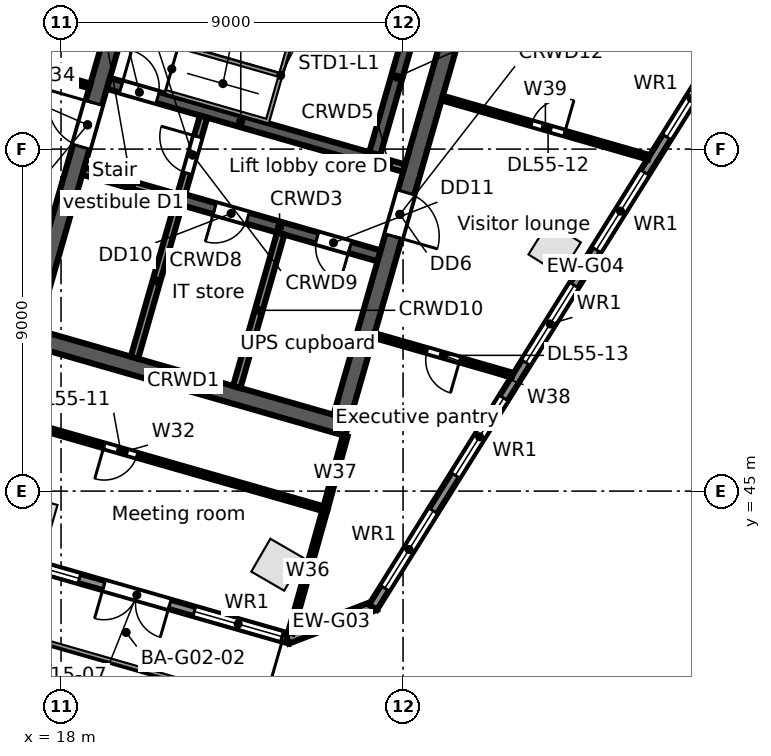
"""IFC4 building model, lengths in metres.
Left out: names, types, materials, properties, quantities, classifications, styles, units other than length and angle.
Written with IfcOpenShell. Run it as: python <this file> out.ifc"""

import sys

from ifc_helpers import new_model, si_unit, direction, frame, frame_2d, origin, origin_2d, place, context, subcontext, project, spatial, rectangle, extrude, element, fill, save


model = new_model("IFC4")
c1 = context("Model", 3, precision=1e-05, world=origin(), true_north=direction((0.0, 1.0)))
c2 = subcontext(c1, "Body", "Model", "MODEL_VIEW")
j1 = project(units=[si_unit("LENGTHUNIT", "METRE"), si_unit("PLANEANGLEUNIT", "RADIAN")], contexts=[c1])
p1 = place(None, origin())
s1 = spatial("IfcSite", under=j1, at=p1, CompositionType="ELEMENT")
p2 = place(p1, origin())
s2 = spatial("IfcBuilding", under=s1, at=p2, CompositionType="ELEMENT")
p3 = place(p2, frame((0.0, 0.0, 254.3)))
s3 = spatial("IfcBuildingStorey", under=s2, at=p3, CompositionType="ELEMENT", Elevation=254.3)
for number, where, z_axis, x_axis in (
    (1, (17.288, 44.291, 0.0), (0.0, 0.0, 1.0), (0.961, -0.276, 0.0)),
    (2, (23.69, 43.063, 0.0), (0.0, 0.0, 1.0), (-0.865, 0.501, 0.0)),
    (3, (30.99, 51.386, 0.0), (0.0, 0.0, 1.0), (0.53, 0.848, 0.0)),
):
    element("IfcColumn", number, at=place(p3, frame(where, z_axis=z_axis, x_axis=x_axis)), inside=s3, PredefinedType="COLUMN", context=c2, shape_type="SweptSolid", body=[
        extrude(rectangle(XDim=1.0, YDim=1.0, at=origin_2d()), origin(), (0.0, 0.0, 1.0), 3.9),
    ])
p4 = place(p3, frame((24.034, 41.108, 0.0), z_axis=(0.0, 0.0, 1.0), x_axis=(-0.96126060691, 0.275641153683, 0.0)))
e4 = element("IfcWall", 4, at=p4, inside=s3, PredefinedType="STANDARD", context=c2, shape_type="SweptSolid", body=[
    extrude(rectangle(XDim=24.951, YDim=0.25, at=frame_2d((12.475, 0.0))), origin(), (0.0, 0.0, 1.0), 3.55),
])
p5 = place(p4, frame((22.416, 0.0, 0.8)))
e5 = element("IfcOpeningElement", 5, at=p5, cuts=e4, PredefinedType="OPENING", context=c2, shape_type="SweptSolid", body=[
    extrude(rectangle(XDim=2.4, YDim=2.2, at=frame_2d((1.2, 1.1))), frame((0.0, 0.135, 0.0), z_axis=(0.0, -1.0, 0.0), x_axis=(1.0, 0.0, 0.0)), (0.0, 0.0, 1.0), 0.27),
])
p6 = place(p4, frame((19.643, 0.0, 0.8)))
e6 = element("IfcOpeningElement", 6, at=p6, cuts=e4, PredefinedType="OPENING", context=c2, shape_type="SweptSolid", body=[
    extrude(rectangle(XDim=2.4, YDim=2.2, at=frame_2d((1.2, 1.1))), frame((0.0, 0.135, 0.0), z_axis=(0.0, -1.0, 0.0), x_axis=(1.0, 0.0, 0.0)), (0.0, 0.0, 1.0), 0.27),
])
p7 = place(p4, frame((16.869, 0.0, 0.8)))
e7 = element("IfcOpeningElement", 7, at=p7, cuts=e4, PredefinedType="OPENING", context=c2, shape_type="SweptSolid", body=[
    extrude(rectangle(XDim=2.4, YDim=2.2, at=frame_2d((1.2, 1.1))), frame((0.0, 0.135, 0.0), z_axis=(0.0, -1.0, 0.0), x_axis=(1.0, 0.0, 0.0)), (0.0, 0.0, 1.0), 0.27),
])
p8 = place(p4, frame((14.096, 0.0, 0.8)))
e8 = element("IfcOpeningElement", 8, at=p8, cuts=e4, PredefinedType="OPENING", context=c2, shape_type="SweptSolid", body=[
    extrude(rectangle(XDim=2.4, YDim=2.2, at=frame_2d((1.2, 1.1))), frame((0.0, 0.135, 0.0), z_axis=(0.0, -1.0, 0.0), x_axis=(1.0, 0.0, 0.0)), (0.0, 0.0, 1.0), 0.27),
])
p9 = place(p4, frame((11.622, 0.0, 0.0)))
e9 = element("IfcOpeningElement", 9, at=p9, cuts=e4, PredefinedType="OPENING", context=c2, shape_type="SweptSolid", body=[
    extrude(rectangle(XDim=1.8, YDim=2.4, at=frame_2d((0.9, 1.2))), frame((0.0, 0.135, 0.0), z_axis=(0.0, -1.0, 0.0), x_axis=(1.0, 0.0, 0.0)), (0.0, 0.0, 1.0), 0.27),
])
p10 = place(p4, frame((8.549, 0.0, 0.8)))
e10 = element("IfcOpeningElement", 10, at=p10, cuts=e4, PredefinedType="OPENING", context=c2, shape_type="SweptSolid", body=[
    extrude(rectangle(XDim=2.4, YDim=2.2, at=frame_2d((1.2, 1.1))), frame((0.0, 0.135, 0.0), z_axis=(0.0, -1.0, 0.0), x_axis=(1.0, 0.0, 0.0)), (0.0, 0.0, 1.0), 0.27),
])
p11 = place(p4, frame((5.775, 0.0, 0.8)))
e11 = element("IfcOpeningElement", 11, at=p11, cuts=e4, PredefinedType="OPENING", context=c2, shape_type="SweptSolid", body=[
    extrude(rectangle(XDim=2.4, YDim=2.2, at=frame_2d((1.2, 1.1))), frame((0.0, 0.135, 0.0), z_axis=(0.0, -1.0, 0.0), x_axis=(1.0, 0.0, 0.0)), (0.0, 0.0, 1.0), 0.27),
])
p12 = place(p4, frame((3.302, 0.0, 0.0)))
e12 = element("IfcOpeningElement", 12, at=p12, cuts=e4, PredefinedType="OPENING", context=c2, shape_type="SweptSolid", body=[
    extrude(rectangle(XDim=1.8, YDim=2.4, at=frame_2d((0.9, 1.2))), frame((0.0, 0.135, 0.0), z_axis=(0.0, -1.0, 0.0), x_axis=(1.0, 0.0, 0.0)), (0.0, 0.0, 1.0), 0.27),
])
p13 = place(p4, frame((0.229, 0.0, 0.8)))
e13 = element("IfcOpeningElement", 13, at=p13, cuts=e4, PredefinedType="OPENING", context=c2, shape_type="SweptSolid", body=[
    extrude(rectangle(XDim=2.4, YDim=2.2, at=frame_2d((1.2, 1.1))), frame((0.0, 0.135, 0.0), z_axis=(0.0, -1.0, 0.0), x_axis=(1.0, 0.0, 0.0)), (0.0, 0.0, 1.0), 0.27),
])
p14 = place(p3, frame((26.27, 41.993, 0.0), z_axis=(0.0, 0.0, 1.0), x_axis=(-0.933573798066, -0.358385216722, 0.0)))
e14 = element("IfcWall", 14, at=p14, inside=s3, PredefinedType="STANDARD", context=c2, shape_type="SweptSolid", body=[
    extrude(rectangle(XDim=2.48, YDim=0.25, at=frame_2d((1.24, 0.0))), origin(), (0.0, 0.0, 1.0), 3.55),
])
p15 = place(p3, frame((37.392, 59.84, 0.0), z_axis=(0.0, 0.0, 1.0), x_axis=(-0.529919909431, -0.848047692992, 0.0)))
e15 = element("IfcWall", 15, at=p15, inside=s3, PredefinedType="STANDARD", context=c2, shape_type="SweptSolid", body=[
    extrude(rectangle(XDim=21.104, YDim=0.25, at=frame_2d((10.552, 0.0))), origin(), (0.0, 0.0, 1.0), 3.55),
])
p16 = place(p15, frame((18.112, 0.0, 0.8)))
e16 = element("IfcOpeningElement", 16, at=p16, cuts=e15, PredefinedType="OPENING", context=c2, shape_type="SweptSolid", body=[
    extrude(rectangle(XDim=2.4, YDim=2.2, at=frame_2d((1.2, 1.1))), frame((0.0, 0.135, 0.0), z_axis=(0.0, -1.0, 0.0), x_axis=(1.0, 0.0, 0.0)), (0.0, 0.0, 1.0), 0.27),
])
p17 = place(p15, frame((14.612, 0.0, 0.8)))
e17 = element("IfcOpeningElement", 17, at=p17, cuts=e15, PredefinedType="OPENING", context=c2, shape_type="SweptSolid", body=[
    extrude(rectangle(XDim=2.4, YDim=2.2, at=frame_2d((1.2, 1.1))), frame((0.0, 0.135, 0.0), z_axis=(0.0, -1.0, 0.0), x_axis=(1.0, 0.0, 0.0)), (0.0, 0.0, 1.0), 0.27),
])
p18 = place(p15, frame((11.112, 0.0, 0.8)))
e18 = element("IfcOpeningElement", 18, at=p18, cuts=e15, PredefinedType="OPENING", context=c2, shape_type="SweptSolid", body=[
    extrude(rectangle(XDim=2.4, YDim=2.2, at=frame_2d((1.2, 1.1))), frame((0.0, 0.135, 0.0), z_axis=(0.0, -1.0, 0.0), x_axis=(1.0, 0.0, 0.0)), (0.0, 0.0, 1.0), 0.27),
])
p19 = place(p15, frame((7.612, 0.0, 0.8)))
e19 = element("IfcOpeningElement", 19, at=p19, cuts=e15, PredefinedType="OPENING", context=c2, shape_type="SweptSolid", body=[
    extrude(rectangle(XDim=2.4, YDim=2.2, at=frame_2d((1.2, 1.1))), frame((0.0, 0.135, 0.0), z_axis=(0.0, -1.0, 0.0), x_axis=(1.0, 0.0, 0.0)), (0.0, 0.0, 1.0), 0.27),
])
p20 = place(p15, frame((4.112, 0.0, 0.8)))
e20 = element("IfcOpeningElement", 20, at=p20, cuts=e15, PredefinedType="OPENING", context=c2, shape_type="SweptSolid", body=[
    extrude(rectangle(XDim=2.4, YDim=2.2, at=frame_2d((1.2, 1.1))), frame((0.0, 0.135, 0.0), z_axis=(0.0, -1.0, 0.0), x_axis=(1.0, 0.0, 0.0)), (0.0, 0.0, 1.0), 0.27),
])
p21 = place(p15, frame((0.612, 0.0, 0.8)))
e21 = element("IfcOpeningElement", 21, at=p21, cuts=e15, PredefinedType="OPENING", context=c2, shape_type="SweptSolid", body=[
    extrude(rectangle(XDim=2.4, YDim=2.2, at=frame_2d((1.2, 1.1))), frame((0.0, 0.135, 0.0), z_axis=(0.0, -1.0, 0.0), x_axis=(1.0, 0.0, 0.0)), (0.0, 0.0, 1.0), 0.27),
])
p22 = place(p3, frame((16.89, 49.149, 0.0), z_axis=(0.0, 0.0, 1.0), x_axis=(0.96126248289, -0.275634611374, 0.0)))
e22 = element("IfcWall", 22, at=p22, inside=s3, PredefinedType="SOLIDWALL", context=c2, shape_type="SweptSolid", body=[
    extrude(rectangle(XDim=9.0, YDim=0.45, at=frame_2d((4.5, 0.0))), origin(), (0.0, 0.0, 1.0), 3.55),
])
p23 = place(p3, frame((18.583, 53.423, 0.0), z_axis=(0.0, 0.0, 1.0), x_axis=(0.961259287968, -0.275645753268, 0.0)))
e23 = element("IfcWall", 23, at=p23, inside=s3, PredefinedType="SOLIDWALL", context=c2, shape_type="SweptSolid", body=[
    extrude(rectangle(XDim=2.65, YDim=0.2, at=frame_2d((1.325, 0.0))), origin(), (0.0, 0.0, 1.0), 3.55),
])
p24 = place(p3, frame((21.131, 52.692, 0.0), z_axis=(0.0, 0.0, 1.0), x_axis=(0.961261488075, -0.275638080722, 0.0)))
e24 = element("IfcWall", 24, at=p24, inside=s3, PredefinedType="SOLIDWALL", context=c2, shape_type="SweptSolid", body=[
    extrude(rectangle(XDim=5.45, YDim=0.3, at=frame_2d((2.725, 0.0))), origin(), (0.0, 0.0, 1.0), 3.55),
])
p25 = place(p24, frame((0.95, 0.0, 0.0)))
e25 = element("IfcOpeningElement", 25, at=p25, cuts=e24, PredefinedType="OPENING", context=c2, shape_type="SweptSolid", body=[
    extrude(rectangle(XDim=0.9, YDim=2.1, at=frame_2d((0.45, 1.05))), frame((0.0, 0.16, 0.0), z_axis=(0.0, -1.0, 0.0), x_axis=(1.0, 0.0, 0.0)), (0.0, 0.0, 1.0), 0.32),
])
p26 = place(p24, frame((3.75, 0.0, 0.0)))
e26 = element("IfcOpeningElement", 26, at=p26, cuts=e24, PredefinedType="OPENING", context=c2, shape_type="SweptSolid", body=[
    extrude(rectangle(XDim=0.9, YDim=2.1, at=frame_2d((0.45, 1.05))), frame((0.0, 0.16, 0.0), z_axis=(0.0, -1.0, 0.0), x_axis=(1.0, 0.0, 0.0)), (0.0, 0.0, 1.0), 0.32),
])
p27 = place(p3, frame((19.245, 55.73, 0.0), z_axis=(0.0, 0.0, 1.0), x_axis=(0.961263007877, -0.275632780503, 0.0)))
e27 = element("IfcWall", 27, at=p27, inside=s3, PredefinedType="SOLIDWALL", context=c2, shape_type="SweptSolid", body=[
    extrude(rectangle(XDim=7.25, YDim=0.3, at=frame_2d((3.625, 0.0))), origin(), (0.0, 0.0, 1.0), 3.55),
])
p28 = place(p27, frame((0.35, 0.0, 0.0)))
e28 = element("IfcOpeningElement", 28, at=p28, cuts=e27, PredefinedType="OPENING", context=c2, shape_type="SweptSolid", body=[
    extrude(rectangle(XDim=1.0, YDim=2.1, at=frame_2d((0.5, 1.05))), frame((0.0, 0.16, 0.0), z_axis=(0.0, -1.0, 0.0), x_axis=(1.0, 0.0, 0.0)), (0.0, 0.0, 1.0), 0.32),
])
p29 = place(p3, frame((26.214, 53.732, 0.0), z_axis=(0.0, 0.0, 1.0), x_axis=(0.961241665642, -0.275707200184, 0.0)))
e29 = element("IfcWall", 29, at=p29, inside=s3, PredefinedType="SOLIDWALL", context=c2, shape_type="SweptSolid", body=[
    extrude(rectangle(XDim=0.85, YDim=0.2, at=frame_2d((0.425, 0.0))), origin(), (0.0, 0.0, 1.0), 3.55),
])
p30 = place(p3, frame((17.168, 49.303, 0.0), z_axis=(0.0, 0.0, 1.0), x_axis=(0.275638974822, 0.961261231695, 0.0)))
e30 = element("IfcWall", 30, at=p30, inside=s3, PredefinedType="SOLIDWALL", context=c2, shape_type="SweptSolid", body=[
    extrude(rectangle(XDim=11.1, YDim=0.45, at=frame_2d((5.55, 0.0))), origin(), (0.0, 0.0, 1.0), 3.55),
])
p31 = place(p30, frame((4.95, 0.0, 0.0)))
e31 = element("IfcOpeningElement", 31, at=p31, cuts=e30, PredefinedType="OPENING", context=c2, shape_type="SweptSolid", body=[
    extrude(rectangle(XDim=1.2, YDim=2.1, at=frame_2d((0.6, 1.05))), frame((0.0, 0.235, 0.0), z_axis=(0.0, -1.0, 0.0), x_axis=(1.0, 0.0, 0.0)), (0.0, 0.0, 1.0), 0.47),
])
p32 = place(p3, frame((19.932, 48.511, 0.0), z_axis=(0.0, 0.0, 1.0), x_axis=(0.275642273411, 0.961260285827, 0.0)))
e32 = element("IfcWall", 32, at=p32, inside=s3, PredefinedType="SOLIDWALL", context=c2, shape_type="SweptSolid", body=[
    extrude(rectangle(XDim=4.2, YDim=0.2, at=frame_2d((2.1, 0.0))), origin(), (0.0, 0.0, 1.0), 3.55),
])
p33 = place(p3, frame((21.172, 52.837, 0.0), z_axis=(0.0, 0.0, 1.0), x_axis=(0.275657676022, 0.961255868981, 0.0)))
e33 = element("IfcWall", 33, at=p33, inside=s3, PredefinedType="PARTITIONING", context=c2, shape_type="SweptSolid", body=[
    extrude(rectangle(XDim=2.1, YDim=0.2, at=frame_2d((1.05, 0.0))), origin(), (0.0, 0.0, 1.0), 3.55),
])
p34 = place(p33, frame((0.55, 0.0, 0.0)))
e34 = element("IfcOpeningElement", 34, at=p34, cuts=e33, PredefinedType="OPENING", context=c2, shape_type="SweptSolid", body=[
    extrude(rectangle(XDim=1.0, YDim=2.1, at=frame_2d((0.5, 1.05))), frame((0.0, 0.11, 0.0), z_axis=(0.0, -1.0, 0.0), x_axis=(1.0, 0.0, 0.0)), (0.0, 0.0, 1.0), 0.22),
])
p35 = place(p3, frame((22.623, 47.739, 0.0), z_axis=(0.0, 0.0, 1.0), x_axis=(0.275642273411, 0.961260285827, 0.0)))
e35 = element("IfcWall", 35, at=p35, inside=s3, PredefinedType="PARTITIONING", context=c2, shape_type="SweptSolid", body=[
    extrude(rectangle(XDim=4.2, YDim=0.2, at=frame_2d((2.1, 0.0))), origin(), (0.0, 0.0, 1.0), 3.55),
])
p36 = place(p3, frame((26.256, 53.876, 0.0), z_axis=(0.0, 0.0, 1.0), x_axis=(0.275588560745, 0.96127568636, 0.0)))
e36 = element("IfcWall", 36, at=p36, inside=s3, PredefinedType="SOLIDWALL", context=c2, shape_type="SweptSolid", body=[
    extrude(rectangle(XDim=4.2, YDim=0.3, at=frame_2d((2.1, 0.0))), origin(), (0.0, 0.0, 1.0), 3.55),
])
p37 = place(p3, frame((25.387, 46.947, 0.0), z_axis=(0.0, 0.0, 1.0), x_axis=(0.275638974822, 0.961261231695, 0.0)))
e37 = element("IfcWall", 37, at=p37, inside=s3, PredefinedType="SOLIDWALL", context=c2, shape_type="SweptSolid", body=[
    extrude(rectangle(XDim=11.1, YDim=0.45, at=frame_2d((5.55, 0.0))), origin(), (0.0, 0.0, 1.0), 3.55),
])
p38 = place(p37, frame((4.95, 0.0, 0.0)))
e38 = element("IfcOpeningElement", 38, at=p38, cuts=e37, PredefinedType="OPENING", context=c2, shape_type="SweptSolid", body=[
    extrude(rectangle(XDim=1.2, YDim=2.1, at=frame_2d((0.6, 1.05))), frame((0.0, 0.235, 0.0), z_axis=(0.0, -1.0, 0.0), x_axis=(1.0, 0.0, 0.0)), (0.0, 0.0, 1.0), 0.47),
])
p39 = place(p3, frame((14.377, 47.555, 0.0), z_axis=(0.0, 0.0, 1.0), x_axis=(0.961263044958, -0.275632651182, 0.0)))
e39 = element("IfcWall", 39, at=p39, inside=s3, PredefinedType="PARTITIONING", context=c2, shape_type="SweptSolid", body=[
    extrude(rectangle(XDim=11.0, YDim=0.125, at=frame_2d((5.5, 0.0))), origin(), (0.0, 0.0, 1.0), 2.73),
])
p40 = place(p39, frame((4.95, 0.0, 0.0)))
e40 = element("IfcOpeningElement", 40, at=p40, cuts=e39, PredefinedType="OPENING", context=c2, shape_type="SweptSolid", body=[
    extrude(rectangle(XDim=0.9, YDim=2.1, at=frame_2d((0.45, 1.05))), frame((0.0, 0.073, 0.0), z_axis=(0.0, -1.0, 0.0), x_axis=(1.0, 0.0, 0.0)), (0.0, 0.0, 1.0), 0.145),
])
p41 = place(p3, frame((16.857, 56.206, 0.0), z_axis=(0.0, 0.0, 1.0), x_axis=(0.961383985066, -0.275210525341, 0.0)))
e41 = element("IfcWall", 41, at=p41, inside=s3, PredefinedType="PARTITIONING", context=c2, shape_type="SweptSolid", body=[
    extrude(rectangle(XDim=1.977, YDim=0.125, at=frame_2d((0.988, 0.0))), origin(), (0.0, 0.0, 1.0), 3.55),
])
p42 = place(p3, frame((24.036, 41.27, 0.0), z_axis=(0.0, 0.0, 1.0), x_axis=(0.270787421954, 0.962639170256, 0.0)))
e42 = element("IfcWall", 42, at=p42, inside=s3, PredefinedType="PARTITIONING", context=c2, shape_type="SweptSolid", body=[
    extrude(rectangle(XDim=3.379, YDim=0.125, at=frame_2d((1.689, 0.0))), origin(), (0.0, 0.0, 1.0), 3.55),
])
p43 = place(p3, frame((24.951, 44.523, 0.0), z_axis=(0.0, 0.0, 1.0), x_axis=(0.264046927145, 0.964509834198, 0.0)))
e43 = element("IfcWall", 43, at=p43, inside=s3, PredefinedType="PARTITIONING", context=c2, shape_type="SweptSolid", body=[
    extrude(rectangle(XDim=2.0, YDim=0.125, at=frame_2d((1.0, 0.0))), origin(), (0.0, 0.0, 1.0), 2.73),
])
p44 = place(p3, frame((26.237, 49.096, 0.0), z_axis=(0.0, 0.0, 1.0), x_axis=(0.961285271066, -0.275555126304, 0.0)))
e44 = element("IfcWall", 44, at=p44, inside=s3, PredefinedType="PARTITIONING", context=c2, shape_type="SweptSolid", body=[
    extrude(rectangle(XDim=3.789, YDim=0.125, at=frame_2d((1.894, 0.0))), origin(), (0.0, 0.0, 1.0), 2.73),
])
p45 = place(p44, frame((1.45, 0.0, 0.0)))
e45 = element("IfcOpeningElement", 45, at=p45, cuts=e44, PredefinedType="OPENING", context=c2, shape_type="SweptSolid", body=[
    extrude(rectangle(XDim=0.9, YDim=2.1, at=frame_2d((0.45, 1.05))), frame((0.0, 0.073, 0.0), z_axis=(0.0, -1.0, 0.0), x_axis=(1.0, 0.0, 0.0)), (0.0, 0.0, 1.0), 0.145),
])
p46 = place(p3, frame((28.029, 55.344, 0.0), z_axis=(0.0, 0.0, 1.0), x_axis=(0.961249621014, -0.275679462603, 0.0)))
e46 = element("IfcWall", 46, at=p46, inside=s3, PredefinedType="PARTITIONING", context=c2, shape_type="SweptSolid", body=[
    extrude(rectangle(XDim=5.652, YDim=0.125, at=frame_2d((2.826, 0.0))), origin(), (0.0, 0.0, 1.0), 2.73),
])
p47 = place(p46, frame((2.45, 0.0, 0.0)))
e47 = element("IfcOpeningElement", 47, at=p47, cuts=e46, PredefinedType="OPENING", context=c2, shape_type="SweptSolid", body=[
    extrude(rectangle(XDim=0.9, YDim=2.1, at=frame_2d((0.45, 1.05))), frame((0.0, 0.073, 0.0), z_axis=(0.0, -1.0, 0.0), x_axis=(1.0, 0.0, 0.0)), (0.0, 0.0, 1.0), 0.145),
])
p48 = place(p11, origin())
e48 = element("IfcWindow", 48, at=p48, inside=s3, PartitioningType="SINGLE_PANEL", PredefinedType="WINDOW", context=c2, shape_type="SweptSolid", body=[
    extrude(rectangle(XDim=2.4, YDim=2.2, at=frame_2d((1.2, 1.1))), frame((0.0, 0.03, 0.0), z_axis=(0.0, -1.0, 0.0), x_axis=(1.0, 0.0, 0.0)), (0.0, 0.0, 1.0), 0.06),
])
fill(e11, e48)
p49 = place(p12, origin())
e49 = element("IfcDoor", 49, at=p49, inside=s3, OperationType="DOUBLE_DOOR_SINGLE_SWING", PredefinedType="DOOR", context=c2, shape_type="SweptSolid", body=[
    extrude(rectangle(XDim=1.8, YDim=2.4, at=frame_2d((0.9, 1.2))), frame((0.0, 0.025, 0.0), z_axis=(0.0, -1.0, 0.0), x_axis=(1.0, 0.0, 0.0)), (0.0, 0.0, 1.0), 0.05),
])
fill(e12, e49)
p50 = place(p13, origin())
e50 = element("IfcWindow", 50, at=p50, inside=s3, PartitioningType="SINGLE_PANEL", PredefinedType="WINDOW", context=c2, shape_type="SweptSolid", body=[
    extrude(rectangle(XDim=2.4, YDim=2.2, at=frame_2d((1.2, 1.1))), frame((0.0, 0.03, 0.0), z_axis=(0.0, -1.0, 0.0), x_axis=(1.0, 0.0, 0.0)), (0.0, 0.0, 1.0), 0.06),
])
fill(e13, e50)
p51 = place(p16, origin())
e51 = element("IfcWindow", 51, at=p51, inside=s3, PartitioningType="SINGLE_PANEL", PredefinedType="WINDOW", context=c2, shape_type="SweptSolid", body=[
    extrude(rectangle(XDim=2.4, YDim=2.2, at=frame_2d((1.2, 1.1))), frame((0.0, 0.03, 0.0), z_axis=(0.0, -1.0, 0.0), x_axis=(1.0, 0.0, 0.0)), (0.0, 0.0, 1.0), 0.06),
])
fill(e16, e51)
p52 = place(p17, origin())
e52 = element("IfcWindow", 52, at=p52, inside=s3, PartitioningType="SINGLE_PANEL", PredefinedType="WINDOW", context=c2, shape_type="SweptSolid", body=[
    extrude(rectangle(XDim=2.4, YDim=2.2, at=frame_2d((1.2, 1.1))), frame((0.0, 0.03, 0.0), z_axis=(0.0, -1.0, 0.0), x_axis=(1.0, 0.0, 0.0)), (0.0, 0.0, 1.0), 0.06),
])
fill(e17, e52)
p53 = place(p18, origin())
e53 = element("IfcWindow", 53, at=p53, inside=s3, PartitioningType="SINGLE_PANEL", PredefinedType="WINDOW", context=c2, shape_type="SweptSolid", body=[
    extrude(rectangle(XDim=2.4, YDim=2.2, at=frame_2d((1.2, 1.1))), frame((0.0, 0.03, 0.0), z_axis=(0.0, -1.0, 0.0), x_axis=(1.0, 0.0, 0.0)), (0.0, 0.0, 1.0), 0.06),
])
fill(e18, e53)
p54 = place(p19, origin())
e54 = element("IfcWindow", 54, at=p54, inside=s3, PartitioningType="SINGLE_PANEL", PredefinedType="WINDOW", context=c2, shape_type="SweptSolid", body=[
    extrude(rectangle(XDim=2.4, YDim=2.2, at=frame_2d((1.2, 1.1))), frame((0.0, 0.03, 0.0), z_axis=(0.0, -1.0, 0.0), x_axis=(1.0, 0.0, 0.0)), (0.0, 0.0, 1.0), 0.06),
])
fill(e19, e54)
p55 = place(p20, origin())
e55 = element("IfcWindow", 55, at=p55, inside=s3, PartitioningType="SINGLE_PANEL", PredefinedType="WINDOW", context=c2, shape_type="SweptSolid", body=[
    extrude(rectangle(XDim=2.4, YDim=2.2, at=frame_2d((1.2, 1.1))), frame((0.0, 0.03, 0.0), z_axis=(0.0, -1.0, 0.0), x_axis=(1.0, 0.0, 0.0)), (0.0, 0.0, 1.0), 0.06),
])
fill(e20, e55)
p56 = place(p28, origin())
e56 = element("IfcDoor", 56, at=p56, inside=s3, OperationType="SINGLE_SWING_LEFT", PredefinedType="DOOR", context=c2, shape_type="SweptSolid", body=[
    extrude(rectangle(XDim=1.0, YDim=2.1, at=frame_2d((0.5, 1.05))), frame((0.0, 0.025, 0.0), z_axis=(0.0, -1.0, 0.0), x_axis=(1.0, 0.0, 0.0)), (0.0, 0.0, 1.0), 0.05),
])
fill(e28, e56)
p57 = place(p34, origin())
e57 = element("IfcDoor", 57, at=p57, inside=s3, OperationType="SINGLE_SWING_RIGHT", PredefinedType="DOOR", context=c2, shape_type="SweptSolid", body=[
    extrude(rectangle(XDim=1.0, YDim=2.1, at=frame_2d((0.5, 1.05))), frame((0.0, 0.025, 0.0), z_axis=(0.0, -1.0, 0.0), x_axis=(1.0, 0.0, 0.0)), (0.0, 0.0, 1.0), 0.05),
])
fill(e34, e57)
p58 = place(p31, origin())
e58 = element("IfcDoor", 58, at=p58, inside=s3, OperationType="SINGLE_SWING_RIGHT", PredefinedType="DOOR", context=c2, shape_type="SweptSolid", body=[
    extrude(rectangle(XDim=1.2, YDim=2.1, at=frame_2d((0.6, 1.05))), frame((0.0, 0.025, 0.0), z_axis=(0.0, -1.0, 0.0), x_axis=(1.0, 0.0, 0.0)), (0.0, 0.0, 1.0), 0.05),
])
fill(e31, e58)
p59 = place(p38, frame((1.2, 0.0, 0.0), z_axis=(0.0, 0.0, 1.0), x_axis=(-1.0, 0.0, 0.0)))
e59 = element("IfcDoor", 59, at=p59, inside=s3, OperationType="SINGLE_SWING_RIGHT", PredefinedType="DOOR", context=c2, shape_type="SweptSolid", body=[
    extrude(rectangle(XDim=1.2, YDim=2.1, at=frame_2d((0.6, 1.05))), frame((0.0, 0.025, 0.0), z_axis=(0.0, -1.0, 0.0), x_axis=(1.0, 0.0, 0.0)), (0.0, 0.0, 1.0), 0.05),
])
fill(e38, e59)
p60 = place(p25, frame((0.9, 0.0, 0.0), z_axis=(0.0, 0.0, 1.0), x_axis=(-1.0, 0.0, 0.0)))
e60 = element("IfcDoor", 60, at=p60, inside=s3, OperationType="SINGLE_SWING_RIGHT", PredefinedType="DOOR", context=c2, shape_type="SweptSolid", body=[
    extrude(rectangle(XDim=0.9, YDim=2.1, at=frame_2d((0.45, 1.05))), frame((0.0, 0.025, 0.0), z_axis=(0.0, -1.0, 0.0), x_axis=(1.0, 0.0, 0.0)), (0.0, 0.0, 1.0), 0.05),
])
fill(e25, e60)
p61 = place(p26, frame((0.9, 0.0, 0.0), z_axis=(0.0, 0.0, 1.0), x_axis=(-1.0, 0.0, 0.0)))
e61 = element("IfcDoor", 61, at=p61, inside=s3, OperationType="SINGLE_SWING_LEFT", PredefinedType="DOOR", context=c2, shape_type="SweptSolid", body=[
    extrude(rectangle(XDim=0.9, YDim=2.1, at=frame_2d((0.45, 1.05))), frame((0.0, 0.025, 0.0), z_axis=(0.0, -1.0, 0.0), x_axis=(1.0, 0.0, 0.0)), (0.0, 0.0, 1.0), 0.05),
])
fill(e26, e61)
p62 = place(p40, frame((0.9, 0.0, 0.0), z_axis=(0.0, 0.0, 1.0), x_axis=(-1.0, 0.0, 0.0)))
e62 = element("IfcDoor", 62, at=p62, inside=s3, OperationType="SINGLE_SWING_RIGHT", PredefinedType="DOOR", context=c2, shape_type="SweptSolid", body=[
    extrude(rectangle(XDim=0.9, YDim=2.1, at=frame_2d((0.45, 1.05))), frame((0.0, 0.025, 0.0), z_axis=(0.0, -1.0, 0.0), x_axis=(1.0, 0.0, 0.0)), (0.0, 0.0, 1.0), 0.05),
])
fill(e40, e62)
p63 = place(p47, origin())
e63 = element("IfcDoor", 63, at=p63, inside=s3, OperationType="SINGLE_SWING_RIGHT", PredefinedType="DOOR", context=c2, shape_type="SweptSolid", body=[
    extrude(rectangle(XDim=0.9, YDim=2.1, at=frame_2d((0.45, 1.05))), frame((0.0, 0.025, 0.0), z_axis=(0.0, -1.0, 0.0), x_axis=(1.0, 0.0, 0.0)), (0.0, 0.0, 1.0), 0.05),
])
fill(e47, e63)
p64 = place(p45, frame((0.9, 0.0, 0.0), z_axis=(0.0, 0.0, 1.0), x_axis=(-1.0, 0.0, 0.0)))
e64 = element("IfcDoor", 64, at=p64, inside=s3, OperationType="SINGLE_SWING_LEFT", PredefinedType="DOOR", context=c2, shape_type="SweptSolid", body=[
    extrude(rectangle(XDim=0.9, YDim=2.1, at=frame_2d((0.45, 1.05))), frame((0.0, 0.025, 0.0), z_axis=(0.0, -1.0, 0.0), x_axis=(1.0, 0.0, 0.0)), (0.0, 0.0, 1.0), 0.05),
])
fill(e45, e64)
save(model, sys.argv[1])
